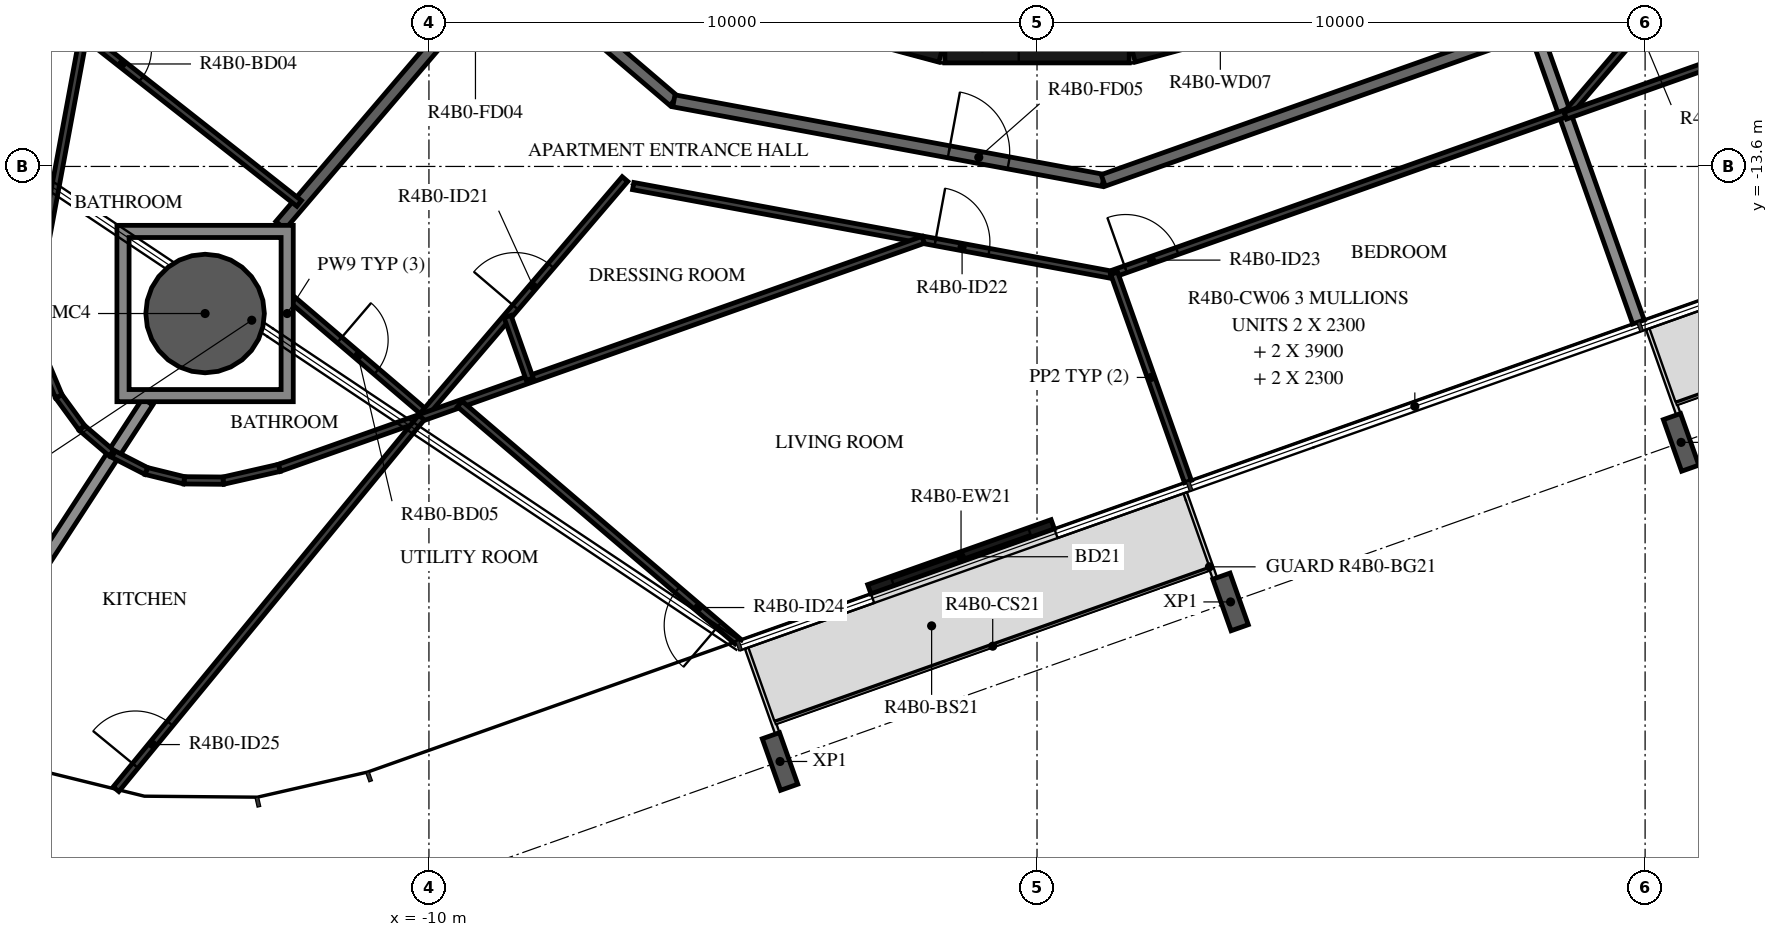
"""IFC4 building model, lengths in metres.
Left out: names, types, materials, properties, quantities, classifications, styles, units other than length and angle.
Written with IfcOpenShell. Run it as: python <this file> out.ifc"""

import sys

from ifc_helpers import new_model, si_unit, direction, frame, frame_2d, origin, origin_2d, place, context, subcontext, project, spatial, polyline, rectangle, hollow_circle, i_section, outline, extrude, element, fill, save


model = new_model("IFC4")
c1 = context("Model", 3, precision=1e-05, world=origin(), true_north=direction((0.0, 1.0)))
c2 = subcontext(c1, "Body", "Model", "MODEL_VIEW")
j1 = project(units=[si_unit("LENGTHUNIT", "METRE"), si_unit("PLANEANGLEUNIT", "RADIAN")], contexts=[c1])
p1 = place(None, origin())
s1 = spatial("IfcSite", under=j1, at=p1, CompositionType="ELEMENT")
p2 = place(p1, origin())
s2 = spatial("IfcBuilding", under=s1, at=p2, CompositionType="ELEMENT")
p3 = place(p2, frame((0.0, 0.0, 165.7)))
s3 = spatial("IfcBuildingStorey", under=s2, at=p3, CompositionType="ELEMENT", Elevation=165.7)
p4 = place(p3, frame((-13.681, -16.019, -0.38), z_axis=(0.0, 0.0, 1.0), x_axis=(1.0, 0.0, 0.0)))
e1 = element("IfcColumn", 1, at=p4, inside=s3, PredefinedType="COLUMN", context=c2, shape_type="SweptSolid", body=[
    extrude(hollow_circle(Radius=0.975, WallThickness=0.045, at=origin_2d()), origin(), (0.0, 0.0, 1.0), 3.5),
])
for number, where, z_axis, x_axis in (
    (2, (10.592, -18.138, -0.38), (0.0, 0.0, 1.0), (-0.943, -0.334, 0.0)),
    (3, (-4.226, -23.385, -0.38), (0.0, 0.0, 1.0), (-0.943, -0.334, 0.0)),
    (4, (3.183, -20.761, -0.38), (0.0, 0.0, 1.0), (-0.943, -0.334, 0.0)),
):
    element("IfcColumn", number, at=place(p3, frame(where, z_axis=z_axis, x_axis=x_axis)), inside=s3, PredefinedType="COLUMN", context=c2, shape_type="SweptSolid", body=[
        extrude(i_section(OverallWidth=0.3, OverallDepth=0.9, WebThickness=0.019, FlangeThickness=0.035, FilletRadius=0.03, at=origin_2d()), origin(), (0.0, 0.0, 1.0), 3.5),
    ])
p5 = place(p3, frame((-2.758, -20.552, 0.0), z_axis=(0.0, 0.0, 1.0), x_axis=(0.94265323131, 0.333773704029, 0.0)))
e5 = element("IfcWall", 5, at=p5, inside=s3, PredefinedType="STANDARD", context=c2, shape_type="SweptSolid", body=[
    extrude(rectangle(XDim=3.2, YDim=0.16, at=frame_2d((1.6, 0.0))), origin(), (0.0, 0.0, 1.0), 3.12),
])
p6 = place(p5, frame((0.4, 0.0, 0.0)))
e6 = element("IfcOpeningElement", 6, at=p6, cuts=e5, PredefinedType="OPENING", context=c2, shape_type="SweptSolid", body=[
    extrude(rectangle(XDim=2.4, YDim=2.4, at=frame_2d((1.2, 1.2))), frame((0.0, 0.09, 0.0), z_axis=(0.0, -1.0, 0.0), x_axis=(1.0, 0.0, 0.0)), (0.0, 0.0, 1.0), 0.18),
])
p7 = place(p3, frame((1.55, -11.643, 0.0), z_axis=(0.0, 0.0, 1.0), x_axis=(0.965948410781, 0.258734743916, 0.0)))
e7 = element("IfcWall", 7, at=p7, inside=s3, PredefinedType="SHEAR", context=c2, shape_type="SweptSolid", body=[
    extrude(rectangle(XDim=3.033, YDim=0.5, at=frame_2d((1.516, 0.0))), origin(), (0.0, 0.0, 1.0), 3.12),
])
p8 = place(p7, frame((1.066, 0.0, 0.0)))
e8 = element("IfcOpeningElement", 8, at=p8, cuts=e7, PredefinedType="OPENING", context=c2, shape_type="SweptSolid", body=[
    extrude(rectangle(XDim=0.9, YDim=2.1, at=frame_2d((0.45, 1.05))), frame((0.0, 0.26, 0.0), z_axis=(0.0, -1.0, 0.0), x_axis=(1.0, 0.0, 0.0)), (0.0, 0.0, 1.0), 0.52),
])
p9 = place(p3, frame((-4.479, -10.858, 0.0), z_axis=(0.0, 0.0, 1.0), x_axis=(0.965948410781, -0.258734743916, 0.0)))
e9 = element("IfcWall", 9, at=p9, inside=s3, PredefinedType="SHEAR", context=c2, shape_type="SweptSolid", body=[
    extrude(rectangle(XDim=3.033, YDim=0.5, at=frame_2d((1.516, 0.0))), origin(), (0.0, 0.0, 1.0), 3.12),
])
p10 = place(p3, frame((-1.516, -11.647, 0.0), z_axis=(0.0, 0.0, 1.0), x_axis=(1.0, 0.0, 0.0)))
e10 = element("IfcWall", 10, at=p10, inside=s3, PredefinedType="SHEAR", context=c2, shape_type="SweptSolid", body=[
    extrude(rectangle(XDim=3.033, YDim=0.5, at=frame_2d((1.516, 0.0))), origin(), (0.0, 0.0, 1.0), 3.12),
])
p11 = place(p10, frame((0.016, 0.0, 0.0)))
e11 = element("IfcOpeningElement", 11, at=p11, cuts=e10, PredefinedType="OPENING", context=c2, shape_type="SweptSolid", body=[
    extrude(rectangle(XDim=1.2, YDim=2.1, at=frame_2d((0.6, 1.05))), frame((0.0, 0.26, 0.0), z_axis=(0.0, -1.0, 0.0), x_axis=(1.0, 0.0, 0.0)), (0.0, 0.0, 1.0), 0.52),
])
p12 = place(p3, frame((-11.433, -7.858, 0.0), z_axis=(0.0, 0.0, 1.0), x_axis=(0.760412154545, -0.649440801937, 0.0)))
e12 = element("IfcWall", 12, at=p12, inside=s3, PredefinedType="STANDARD", context=c2, shape_type="SweptSolid", body=[
    extrude(rectangle(XDim=7.181, YDim=0.2, at=frame_2d((3.59, 0.0))), origin(), (0.0, 0.0, 1.0), 3.12),
])
p13 = place(p12, frame((2.39, 0.0, 0.0)))
e13 = element("IfcOpeningElement", 13, at=p13, cuts=e12, PredefinedType="OPENING", context=c2, shape_type="SweptSolid", body=[
    extrude(rectangle(XDim=1.0, YDim=2.1, at=frame_2d((0.5, 1.05))), frame((0.0, 0.11, 0.0), z_axis=(0.0, -1.0, 0.0), x_axis=(1.0, 0.0, 0.0)), (0.0, 0.0, 1.0), 0.22),
])
p14 = place(p3, frame((-5.972, -12.521, 0.0), z_axis=(0.0, 0.0, 1.0), x_axis=(0.983256068163, -0.18222926335, 0.0)))
e14 = element("IfcWall", 14, at=p14, inside=s3, PredefinedType="STANDARD", context=c2, shape_type="SweptSolid", body=[
    extrude(rectangle(XDim=7.181, YDim=0.2, at=frame_2d((3.59, 0.0))), origin(), (0.0, 0.0, 1.0), 3.12),
])
p15 = place(p14, frame((4.6, 0.0, 0.0)))
e15 = element("IfcOpeningElement", 15, at=p15, cuts=e14, PredefinedType="OPENING", context=c2, shape_type="SweptSolid", body=[
    extrude(rectangle(XDim=1.0, YDim=2.1, at=frame_2d((0.5, 1.05))), frame((0.0, 0.11, 0.0), z_axis=(0.0, -1.0, 0.0), x_axis=(1.0, 0.0, 0.0)), (0.0, 0.0, 1.0), 0.22),
])
p16 = place(p3, frame((1.088, -13.83, 0.0), z_axis=(0.0, 0.0, 1.0), x_axis=(0.942648397945, 0.333787354241, 0.0)))
e16 = element("IfcWall", 16, at=p16, inside=s3, PredefinedType="STANDARD", context=c2, shape_type="SweptSolid", body=[
    extrude(rectangle(XDim=7.181, YDim=0.2, at=frame_2d((3.591, 0.0))), origin(), (0.0, 0.0, 1.0), 3.12),
])
p17 = place(p3, frame((-12.441, -14.569, 0.0), z_axis=(0.0, 0.0, 1.0), x_axis=(0.649446013128, 0.760407703822, 0.0)))
e17 = element("IfcWall", 17, at=p17, inside=s3, PredefinedType="STANDARD", context=c2, shape_type="SweptSolid", body=[
    extrude(rectangle(XDim=5.758, YDim=0.2, at=frame_2d((2.879, 0.0))), origin(), (0.0, 0.0, 1.0), 3.12),
])
p18 = place(p3, frame((-18.04, -22.713, 0.0), z_axis=(0.0, 0.0, 1.0), x_axis=(0.545628572271, 0.838027124335, 0.0)))
e18 = element("IfcWall", 18, at=p18, inside=s3, PredefinedType="STANDARD", context=c2, shape_type="SweptSolid", body=[
    extrude(rectangle(XDim=6.258, YDim=0.2, at=frame_2d((3.129, 0.0))), origin(), (0.0, 0.0, 1.0), 2.73),
])
p19 = place(p3, frame((9.891, -16.158, 0.0), z_axis=(0.0, 0.0, 1.0), x_axis=(-0.333807281402, 0.942641341594, 0.0)))
e19 = element("IfcWall", 19, at=p19, inside=s3, PredefinedType="STANDARD", context=c2, shape_type="SweptSolid", body=[
    extrude(rectangle(XDim=5.329, YDim=0.2, at=frame_2d((2.665, 0.0))), origin(), (0.0, 0.0, 1.0), 2.73),
])
p20 = place(p3, frame((-21.461, -17.671, 0.0), z_axis=(0.0, 0.0, 1.0), x_axis=(0.519791999186, 0.854292852353, 0.0)))
e20 = element("IfcWall", 20, at=p20, inside=s3, PredefinedType="PARTITIONING", context=c2, shape_type="SweptSolid", body=[
    extrude(rectangle(XDim=12.247, YDim=0.12, at=frame_2d((6.124, 0.0))), origin(), (0.0, 0.0, 1.0), 3.12),
])
p21 = place(p20, frame((1.0, 0.0, 0.0)))
e21 = element("IfcOpeningElement", 21, at=p21, cuts=e20, PredefinedType="OPENING", context=c2, shape_type="SweptSolid", body=[
    extrude(rectangle(XDim=0.9, YDim=2.1, at=frame_2d((0.45, 1.05))), frame((0.0, 0.07, 0.0), z_axis=(0.0, -1.0, 0.0), x_axis=(1.0, 0.0, 0.0)), (0.0, 0.0, 1.0), 0.14),
])
p22 = place(p3, frame((-14.882, -7.133, 0.0), z_axis=(0.0, 0.0, 1.0), x_axis=(-0.182231858218, -0.983255587246, 0.0)))
e22 = element("IfcWall", 22, at=p22, inside=s3, PredefinedType="PARTITIONING", context=c2, shape_type="SweptSolid", body=[
    extrude(rectangle(XDim=8.215, YDim=0.12, at=frame_2d((4.107, 0.0))), origin(), (0.0, 0.0, 1.0), 3.12),
])
p23 = place(p22, frame((1.9, 0.0, 0.0)))
e23 = element("IfcOpeningElement", 23, at=p23, cuts=e22, PredefinedType="OPENING", context=c2, shape_type="SweptSolid", body=[
    extrude(rectangle(XDim=0.9, YDim=2.1, at=frame_2d((0.45, 1.05))), frame((0.0, 0.07, 0.0), z_axis=(0.0, -1.0, 0.0), x_axis=(1.0, 0.0, 0.0)), (0.0, 0.0, 1.0), 0.14),
])
p24 = place(p3, frame((-15.677, -11.42, 0.0), z_axis=(0.0, 0.0, 1.0), x_axis=(0.785821888461, -0.618452875824, 0.0)))
e24 = element("IfcWall", 24, at=p24, inside=s3, PredefinedType="PARTITIONING", context=c2, shape_type="SweptSolid", body=[
    extrude(rectangle(XDim=4.507, YDim=0.12, at=frame_2d((2.254, 0.0))), origin(), (0.0, 0.0, 1.0), 3.12),
])
p25 = place(p24, frame((0.4, 0.0, 0.0)))
e25 = element("IfcOpeningElement", 25, at=p25, cuts=e24, PredefinedType="OPENING", context=c2, shape_type="SweptSolid", body=[
    extrude(rectangle(XDim=0.8, YDim=2.1, at=frame_2d((0.4, 1.05))), frame((0.0, 0.07, 0.0), z_axis=(0.0, -1.0, 0.0), x_axis=(1.0, 0.0, 0.0)), (0.0, 0.0, 1.0), 0.14),
])
for number, where, z_axis, x_axis in (
    (26, (-15.22, -18.315, 0.0), (0.0, 0.0, 1.0), (-0.76, 0.65, 0.0)),
    (27, (-15.708, -17.898, 0.0), (0.0, 0.0, 1.0), (-0.59, 0.807, 0.0)),
):
    element("IfcWall", number, at=place(p3, frame(where, z_axis=z_axis, x_axis=x_axis)), inside=s3, PredefinedType="PARTITIONING", context=c2, shape_type="SweptSolid", body=[
        extrude(rectangle(XDim=0.642, YDim=0.12, at=frame_2d((0.321, 0.0))), origin(), (0.0, 0.0, 1.0), 3.12),
    ])
p26 = place(p3, frame((-16.087, -17.38, 0.0), z_axis=(0.0, 0.0, 1.0), x_axis=(-0.387852998664, 0.921721243884, 0.0)))
e28 = element("IfcWall", 28, at=p26, inside=s3, PredefinedType="PARTITIONING", context=c2, shape_type="SweptSolid", body=[
    extrude(rectangle(XDim=0.642, YDim=0.12, at=frame_2d((0.321, 0.0))), origin(), (0.0, 0.0, 1.0), 3.12),
])
p27 = place(p3, frame((-12.231, -15.804, 0.0), z_axis=(0.0, 0.0, 1.0), x_axis=(0.760403625387, -0.649450788357, 0.0)))
e29 = element("IfcWall", 29, at=p27, inside=s3, PredefinedType="PARTITIONING", context=c2, shape_type="SweptSolid", body=[
    extrude(rectangle(XDim=2.852, YDim=0.12, at=frame_2d((1.426, 0.0))), origin(), (0.0, 0.0, 1.0), 3.12),
])
p28 = place(p27, frame((1.0, 0.0, 0.0)))
e30 = element("IfcOpeningElement", 30, at=p28, cuts=e29, PredefinedType="OPENING", context=c2, shape_type="SweptSolid", body=[
    extrude(rectangle(XDim=0.8, YDim=2.1, at=frame_2d((0.4, 1.05))), frame((0.0, 0.07, 0.0), z_axis=(0.0, -1.0, 0.0), x_axis=(1.0, 0.0, 0.0)), (0.0, 0.0, 1.0), 0.14),
])
p29 = place(p3, frame((-10.063, -17.656, 0.0), z_axis=(0.0, 0.0, 1.0), x_axis=(0.649451567172, 0.760402960211, 0.0)))
e31 = element("IfcWall", 31, at=p29, inside=s3, PredefinedType="PARTITIONING", context=c2, shape_type="SweptSolid", body=[
    extrude(rectangle(XDim=5.061, YDim=0.12, at=frame_2d((2.531, 0.0))), origin(), (0.0, 0.0, 1.0), 3.12),
])
p30 = place(p29, frame((2.288, 0.0, 0.0)))
e32 = element("IfcOpeningElement", 32, at=p30, cuts=e31, PredefinedType="OPENING", context=c2, shape_type="SweptSolid", body=[
    extrude(rectangle(XDim=0.9, YDim=2.1, at=frame_2d((0.45, 1.05))), frame((0.0, 0.07, 0.0), z_axis=(0.0, -1.0, 0.0), x_axis=(1.0, 0.0, 0.0)), (0.0, 0.0, 1.0), 0.14),
])
p31 = place(p3, frame((-6.641, -13.923, 0.0), z_axis=(0.0, 0.0, 1.0), x_axis=(0.983250157272, -0.182261153912, 0.0)))
e33 = element("IfcWall", 33, at=p31, inside=s3, PredefinedType="PARTITIONING", context=c2, shape_type="SweptSolid", body=[
    extrude(rectangle(XDim=7.985, YDim=0.12, at=frame_2d((3.992, 0.0))), origin(), (0.0, 0.0, 1.0), 3.12),
])
p32 = place(p31, frame((5.051, 0.0, 0.0)))
e34 = element("IfcOpeningElement", 34, at=p32, cuts=e33, PredefinedType="OPENING", context=c2, shape_type="SweptSolid", body=[
    extrude(rectangle(XDim=0.9, YDim=2.1, at=frame_2d((0.45, 1.05))), frame((0.0, 0.07, 0.0), z_axis=(0.0, -1.0, 0.0), x_axis=(1.0, 0.0, 0.0)), (0.0, 0.0, 1.0), 0.14),
])
p33 = place(p3, frame((1.269, -15.357, 0.0), z_axis=(0.0, 0.0, 1.0), x_axis=(0.942639442898, 0.333812643101, 0.0)))
e35 = element("IfcWall", 35, at=p33, inside=s3, PredefinedType="PARTITIONING", context=c2, shape_type="SweptSolid", body=[
    extrude(rectangle(XDim=7.86, YDim=0.12, at=frame_2d((3.93, 0.0))), origin(), (0.0, 0.0, 1.0), 3.12),
])
p34 = place(p33, frame((0.2, 0.0, 0.0)))
e36 = element("IfcOpeningElement", 36, at=p34, cuts=e35, PredefinedType="OPENING", context=c2, shape_type="SweptSolid", body=[
    extrude(rectangle(XDim=0.9, YDim=2.1, at=frame_2d((0.45, 1.05))), frame((0.0, 0.07, 0.0), z_axis=(0.0, -1.0, 0.0), x_axis=(1.0, 0.0, 0.0)), (0.0, 0.0, 1.0), 0.14),
])
p35 = place(p3, frame((-1.871, -14.807, 0.0), z_axis=(0.0, 0.0, 1.0), x_axis=(-0.942640759962, -0.333808923874, 0.0)))
e37 = element("IfcWall", 37, at=p35, inside=s3, PredefinedType="PARTITIONING", context=c2, shape_type="SweptSolid", body=[
    extrude(rectangle(XDim=11.234, YDim=0.12, at=frame_2d((5.617, 0.0))), origin(), (0.0, 0.0, 1.0), 3.12),
])
p36 = place(p3, frame((-12.461, -18.557, 0.0), z_axis=(0.0, 0.0, 1.0), x_axis=(-0.975039040601, -0.222033486897, 0.0)))
e38 = element("IfcWall", 38, at=p36, inside=s3, PredefinedType="PARTITIONING", context=c2, shape_type="SweptSolid", body=[
    extrude(rectangle(XDim=0.947, YDim=0.12, at=frame_2d((0.473, 0.0))), origin(), (0.0, 0.0, 1.0), 3.12),
])
p37 = place(p3, frame((-13.384, -18.767, 0.0), z_axis=(0.0, 0.0, 1.0), x_axis=(-0.999965015064, 0.008364726362, 0.0)))
e39 = element("IfcWall", 39, at=p37, inside=s3, PredefinedType="PARTITIONING", context=c2, shape_type="SweptSolid", body=[
    extrude(rectangle(XDim=0.642, YDim=0.12, at=frame_2d((0.321, 0.0))), origin(), (0.0, 0.0, 1.0), 3.12),
])
p38 = place(p3, frame((-14.026, -18.762, 0.0), z_axis=(0.0, 0.0, 1.0), x_axis=(-0.970964611728, 0.239223165208, 0.0)))
e40 = element("IfcWall", 40, at=p38, inside=s3, PredefinedType="PARTITIONING", context=c2, shape_type="SweptSolid", body=[
    extrude(rectangle(XDim=0.642, YDim=0.12, at=frame_2d((0.321, 0.0))), origin(), (0.0, 0.0, 1.0), 3.12),
])
p39 = place(p3, frame((-14.649, -18.608, 0.0), z_axis=(0.0, 0.0, 1.0), x_axis=(-0.889695551631, 0.456554296232, 0.0)))
e41 = element("IfcWall", 41, at=p39, inside=s3, PredefinedType="PARTITIONING", context=c2, shape_type="SweptSolid", body=[
    extrude(rectangle(XDim=0.605, YDim=0.12, at=frame_2d((0.302, 0.0))), origin(), (0.0, 0.0, 1.0), 3.12),
])
p40 = place(p3, frame((-15.146, -23.841, 0.0), z_axis=(0.0, 0.0, 1.0), x_axis=(0.634970373647, 0.772536487547, 0.0)))
e42 = element("IfcWall", 42, at=p40, inside=s3, PredefinedType="PARTITIONING", context=c2, shape_type="SweptSolid", body=[
    extrude(rectangle(XDim=7.912, YDim=0.12, at=frame_2d((3.956, 0.0))), origin(), (0.0, 0.0, 1.0), 3.12),
])
p41 = place(p40, frame((0.5, 0.0, 0.0)))
e43 = element("IfcOpeningElement", 43, at=p41, cuts=e42, PredefinedType="OPENING", context=c2, shape_type="SweptSolid", body=[
    extrude(rectangle(XDim=0.9, YDim=2.1, at=frame_2d((0.45, 1.05))), frame((0.0, 0.07, 0.0), z_axis=(0.0, -1.0, 0.0), x_axis=(1.0, 0.0, 0.0)), (0.0, 0.0, 1.0), 0.14),
])
p42 = place(p3, frame((-8.342, -17.098, 0.0), z_axis=(0.0, 0.0, 1.0), x_axis=(-0.333801646268, 0.942643337084, 0.0)))
e44 = element("IfcWall", 44, at=p42, inside=s3, PredefinedType="PARTITIONING", context=c2, shape_type="SweptSolid", body=[
    extrude(rectangle(XDim=1.093, YDim=0.12, at=frame_2d((0.546, 0.0))), origin(), (0.0, 0.0, 1.0), 3.12),
])
p43 = place(p3, frame((-4.927, -21.406, 0.0), z_axis=(0.0, 0.0, 1.0), x_axis=(-0.760409236665, 0.649444218385, 0.0)))
e45 = element("IfcWall", 45, at=p43, inside=s3, PredefinedType="PARTITIONING", context=c2, shape_type="SweptSolid", body=[
    extrude(rectangle(XDim=6.004, YDim=0.12, at=frame_2d((3.002, 0.0))), origin(), (0.0, 0.0, 1.0), 3.12),
])
p44 = place(p43, frame((0.4, 0.0, 0.0)))
e46 = element("IfcOpeningElement", 46, at=p44, cuts=e45, PredefinedType="OPENING", context=c2, shape_type="SweptSolid", body=[
    extrude(rectangle(XDim=0.9, YDim=2.1, at=frame_2d((0.45, 1.05))), frame((0.0, 0.07, 0.0), z_axis=(0.0, -1.0, 0.0), x_axis=(1.0, 0.0, 0.0)), (0.0, 0.0, 1.0), 0.14),
])
p45 = place(p3, frame((2.482, -18.782, 0.0), z_axis=(0.0, 0.0, 1.0), x_axis=(-0.33379364943, 0.942646168825, 0.0)))
e47 = element("IfcWall", 47, at=p45, inside=s3, PredefinedType="PARTITIONING", context=c2, shape_type="SweptSolid", body=[
    extrude(rectangle(XDim=3.633, YDim=0.12, at=frame_2d((1.816, 0.0))), origin(), (0.0, 0.0, 1.0), 2.73),
])
p46 = place(p3, frame((8.737, -12.713, 0.0), z_axis=(0.0, 0.0, 1.0), x_axis=(0.649430604754, 0.760420863476, 0.0)))
e48 = element("IfcWall", 48, at=p46, inside=s3, PredefinedType="PARTITIONING", context=c2, shape_type="SweptSolid", body=[
    extrude(rectangle(XDim=7.985, YDim=0.12, at=frame_2d((3.992, 0.0))), origin(), (0.0, 0.0, 1.0), 3.12),
])
p47 = place(p46, frame((1.4, 0.0, 0.0)))
e49 = element("IfcOpeningElement", 49, at=p47, cuts=e48, PredefinedType="OPENING", context=c2, shape_type="SweptSolid", body=[
    extrude(rectangle(XDim=0.8, YDim=2.1, at=frame_2d((0.4, 1.05))), frame((0.0, 0.07, 0.0), z_axis=(0.0, -1.0, 0.0), x_axis=(1.0, 0.0, 0.0)), (0.0, 0.0, 1.0), 0.14),
])
p48 = place(p3, frame((14.183, -10.819, 0.0), z_axis=(0.0, 0.0, 1.0), x_axis=(-0.942646448855, -0.333792858612, 0.0)))
e50 = element("IfcWall", 50, at=p48, inside=s3, PredefinedType="PARTITIONING", context=c2, shape_type="SweptSolid", body=[
    extrude(rectangle(XDim=5.828, YDim=0.12, at=frame_2d((2.914, 0.0))), origin(), (0.0, 0.0, 1.0), 3.12),
])
p49 = place(p3, origin())
e51 = element("IfcWall", 51, at=p49, inside=s3, PredefinedType="STANDARD", context=c2, shape_type="SweptSolid", body=[
    extrude(outline(polyline([(-12.231, -14.569), (-12.231, -17.469), (-15.131, -17.469), (-15.131, -14.569), (-12.231, -14.569)]), holes=[polyline([(-14.931, -17.269), (-12.431, -17.269), (-12.431, -14.769), (-14.931, -14.769), (-14.931, -17.269)])]), origin(), (0.0, 0.0, 1.0), 3.12),
])
p50 = place(p6, origin())
e52 = element("IfcDoor", 52, at=p50, inside=s3, OperationType="DOUBLE_DOOR_SLIDING", PredefinedType="DOOR", context=c2, shape_type="SweptSolid", body=[
    extrude(rectangle(XDim=2.4, YDim=2.4, at=frame_2d((1.2, 1.2))), frame((0.0, 0.025, 0.0), z_axis=(0.0, -1.0, 0.0), x_axis=(1.0, 0.0, 0.0)), (0.0, 0.0, 1.0), 0.05),
])
fill(e6, e52)
p51 = place(p25, origin())
e53 = element("IfcDoor", 53, at=p51, inside=s3, OperationType="SINGLE_SWING_RIGHT", PredefinedType="DOOR", context=c2, shape_type="SweptSolid", body=[
    extrude(rectangle(XDim=0.8, YDim=2.1, at=frame_2d((0.4, 1.05))), frame((0.0, 0.025, 0.0), z_axis=(0.0, -1.0, 0.0), x_axis=(1.0, 0.0, 0.0)), (0.0, 0.0, 1.0), 0.05),
])
fill(e25, e53)
p52 = place(p15, origin())
e54 = element("IfcDoor", 54, at=p52, inside=s3, OperationType="SINGLE_SWING_LEFT", PredefinedType="DOOR", context=c2, shape_type="SweptSolid", body=[
    extrude(rectangle(XDim=1.0, YDim=2.1, at=frame_2d((0.5, 1.05))), frame((0.0, 0.025, 0.0), z_axis=(0.0, -1.0, 0.0), x_axis=(1.0, 0.0, 0.0)), (0.0, 0.0, 1.0), 0.05),
])
fill(e15, e54)
p53 = place(p28, origin())
e55 = element("IfcDoor", 55, at=p53, inside=s3, OperationType="SINGLE_SWING_LEFT", PredefinedType="DOOR", context=c2, shape_type="SweptSolid", body=[
    extrude(rectangle(XDim=0.8, YDim=2.1, at=frame_2d((0.4, 1.05))), frame((0.0, 0.025, 0.0), z_axis=(0.0, -1.0, 0.0), x_axis=(1.0, 0.0, 0.0)), (0.0, 0.0, 1.0), 0.05),
])
fill(e30, e55)
p54 = place(p30, origin())
e56 = element("IfcDoor", 56, at=p54, inside=s3, OperationType="SINGLE_SWING_LEFT", PredefinedType="DOOR", context=c2, shape_type="SweptSolid", body=[
    extrude(rectangle(XDim=0.9, YDim=2.1, at=frame_2d((0.45, 1.05))), frame((0.0, 0.025, 0.0), z_axis=(0.0, -1.0, 0.0), x_axis=(1.0, 0.0, 0.0)), (0.0, 0.0, 1.0), 0.05),
])
fill(e32, e56)
p55 = place(p32, origin())
e57 = element("IfcDoor", 57, at=p55, inside=s3, OperationType="SINGLE_SWING_LEFT", PredefinedType="DOOR", context=c2, shape_type="SweptSolid", body=[
    extrude(rectangle(XDim=0.9, YDim=2.1, at=frame_2d((0.45, 1.05))), frame((0.0, 0.025, 0.0), z_axis=(0.0, -1.0, 0.0), x_axis=(1.0, 0.0, 0.0)), (0.0, 0.0, 1.0), 0.05),
])
fill(e34, e57)
p56 = place(p34, origin())
e58 = element("IfcDoor", 58, at=p56, inside=s3, OperationType="SINGLE_SWING_LEFT", PredefinedType="DOOR", context=c2, shape_type="SweptSolid", body=[
    extrude(rectangle(XDim=0.9, YDim=2.1, at=frame_2d((0.45, 1.05))), frame((0.0, 0.025, 0.0), z_axis=(0.0, -1.0, 0.0), x_axis=(1.0, 0.0, 0.0)), (0.0, 0.0, 1.0), 0.05),
])
fill(e36, e58)
p57 = place(p44, origin())
e59 = element("IfcDoor", 59, at=p57, inside=s3, OperationType="SINGLE_SWING_LEFT", PredefinedType="DOOR", context=c2, shape_type="SweptSolid", body=[
    extrude(rectangle(XDim=0.9, YDim=2.1, at=frame_2d((0.45, 1.05))), frame((0.0, 0.025, 0.0), z_axis=(0.0, -1.0, 0.0), x_axis=(1.0, 0.0, 0.0)), (0.0, 0.0, 1.0), 0.05),
])
fill(e46, e59)
p58 = place(p41, origin())
e60 = element("IfcDoor", 60, at=p58, inside=s3, OperationType="SINGLE_SWING_LEFT", PredefinedType="DOOR", context=c2, shape_type="SweptSolid", body=[
    extrude(rectangle(XDim=0.9, YDim=2.1, at=frame_2d((0.45, 1.05))), frame((0.0, 0.025, 0.0), z_axis=(0.0, -1.0, 0.0), x_axis=(1.0, 0.0, 0.0)), (0.0, 0.0, 1.0), 0.05),
])
fill(e43, e60)
save(model, sys.argv[1])
